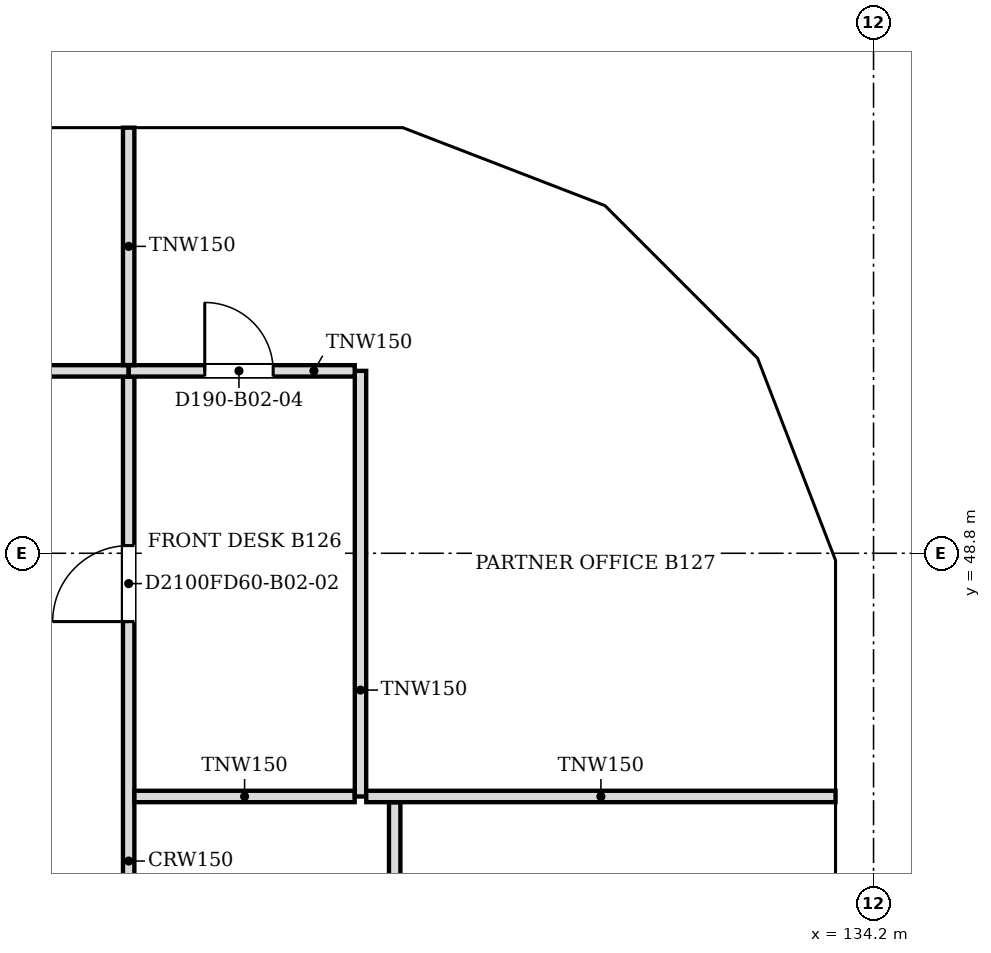
"""IFC4 building model, lengths in metres.
Left out: names, types, materials, properties, quantities, classifications, styles, units other than length and angle.
Written with IfcOpenShell. Run it as: python <this file> out.ifc"""

import sys

from ifc_helpers import new_model, si_unit, direction, frame, frame_2d, origin, place, context, subcontext, project, spatial, polyline, rectangle, outline, extrude, faceted_brep, source, transform, mapped, element, fill, save


model = new_model("IFC4")
c1 = context("Model", 3, precision=1e-05, world=origin(), true_north=direction((0.0, 1.0)))
c2 = subcontext(c1, "Body", "Model", "MODEL_VIEW")
j1 = project(units=[si_unit("LENGTHUNIT", "METRE"), si_unit("PLANEANGLEUNIT", "RADIAN")], contexts=[c1])
p1 = place(None, origin())
s1 = spatial("IfcSite", under=j1, at=p1, CompositionType="ELEMENT")
p2 = place(p1, origin())
s2 = spatial("IfcBuilding", under=s1, at=p2, CompositionType="ELEMENT")
p3 = place(p2, frame((0.0, 0.0, 21.3)))
s3 = spatial("IfcBuildingStorey", under=s2, at=p3, CompositionType="ELEMENT", Elevation=21.3)
m1 = source(origin(), c2, "Body", "SweptSolid", [
    extrude(outline(polyline([(3.05, 0.0), (6.1, 4.5), (3.05, 9.0), (0.0, 4.5), (3.05, 0.0)])), frame((0.0, 0.25, 0.0), z_axis=(0.0, -1.0, 0.0), x_axis=(1.0, 0.0, 0.0)), (0.0, 0.0, 1.0), 0.5),
])
p4 = place(p3, frame((133.95, 39.65, -4.5), z_axis=(0.0, 0.0, 1.0), x_axis=(0.0, 1.0, 0.0)))
e1 = element("IfcWall", 1, at=p4, inside=s3, PredefinedType="SOLIDWALL", context=c2, shape_type="MappedRepresentation", body=[
    mapped(m1, transform((0.0, 0.0, 0.0), scale=1.0)),
])
m2 = source(origin(), c2, "Body", "SweptSolid", [
    extrude(outline(polyline([(3.05, 0.446), (5.798, 4.5), (3.05, 8.554), (0.302, 4.5), (3.05, 0.446)])), frame((0.0, 0.26, 0.0), z_axis=(0.0, -1.0, 0.0), x_axis=(1.0, 0.0, 0.0)), (0.0, 0.0, 1.0), 0.52),
])
p5 = place(p4, origin())
e2 = element("IfcOpeningElement", 2, at=p5, cuts=e1, PredefinedType="OPENING", context=c2, shape_type="MappedRepresentation", body=[
    mapped(m2, transform((0.0, 0.0, 0.0), scale=1.0)),
])
m3 = source(origin(), c2, "Body", "Brep", [
    faceted_brep([(3.003, -0.25, 0.0), (3.05, -0.25, 0.071), (3.05, -0.25, 8.929), (3.003, -0.25, 9.0), (0.0, -0.25, 4.5), (0.0, 0.25, 4.5), (2.957, 0.25, 8.93), (2.957, 0.25, 0.07), (3.003, 0.0, 0.0), (3.003, 0.0, 9.0)], [[[0, 1, 2, 3, 4]], [[5, 6, 7]], [[1, 0, 8]], [[9, 3, 2]], [[6, 5, 4, 3, 9]], [[5, 7, 8, 0, 4]], [[1, 8, 7, 6, 9, 2]]]),
])
p6 = place(p3, frame((133.95, 45.75, -4.5), z_axis=(0.0, 0.0, 1.0), x_axis=(0.0, 1.0, 0.0)))
e3 = element("IfcWall", 3, at=p6, inside=s3, PredefinedType="SOLIDWALL", context=c2, shape_type="MappedRepresentation", body=[
    mapped(m3, transform((0.0, 0.0, 0.0), scale=1.0)),
])
m4 = source(origin(), c2, "Body", "SweptSolid", [
    extrude(outline(polyline([(2.803, 8.25), (0.301, 4.5), (2.803, 0.75), (2.803, 8.25)])), frame((0.0, 0.26, 0.0), z_axis=(0.0, -1.0, 0.0), x_axis=(1.0, 0.0, 0.0)), (0.0, 0.0, 1.0), 0.52),
])
p7 = place(p6, origin())
e4 = element("IfcOpeningElement", 4, at=p7, cuts=e3, PredefinedType="OPENING", context=c2, shape_type="MappedRepresentation", body=[
    mapped(m4, transform((0.0, 0.0, 0.0), scale=1.0)),
])
m5 = source(origin(), c2, "Body", "Brep", [
    faceted_brep([(0.047, -0.25, 0.0), (2.997, -0.25, 4.5), (0.047, -0.25, 9.0), (0.0, -0.25, 8.93), (0.0, -0.25, 0.07), (0.093, 0.25, 8.929), (2.944, 0.25, 4.581), (2.944, 0.25, 4.419), (0.093, 0.25, 0.071), (2.997, 0.0, 4.5), (0.047, 0.0, 0.0), (0.047, 0.0, 9.0)], [[[0, 1, 2, 3, 4]], [[5, 6, 7, 8]], [[8, 7, 9, 1, 0, 10]], [[6, 5, 11, 2, 1, 9]], [[3, 2, 11]], [[10, 0, 4]], [[8, 10, 4, 3, 11, 5]], [[9, 7, 6]]]),
])
p8 = place(p3, frame((133.967, 48.71, -4.5), z_axis=(0.0, 0.0, 1.0), x_axis=(-0.359901446078, 0.932990326376, 0.0)))
e5 = element("IfcWall", 5, at=p8, inside=s3, PredefinedType="SOLIDWALL", context=c2, shape_type="MappedRepresentation", body=[
    mapped(m5, transform((0.0, 0.0, 0.0), scale=1.0)),
])
m6 = source(origin(), c2, "Body", "SweptSolid", [
    extrude(outline(polyline([(0.247, 0.761), (2.698, 4.5), (0.247, 8.239), (0.247, 0.761)])), frame((0.0, 0.26, 0.0), z_axis=(0.0, -1.0, 0.0), x_axis=(1.0, 0.0, 0.0)), (0.0, 0.0, 1.0), 0.52),
])
p9 = place(p8, origin())
e6 = element("IfcOpeningElement", 6, at=p9, cuts=e5, PredefinedType="OPENING", context=c2, shape_type="MappedRepresentation", body=[
    mapped(m6, transform((0.0, 0.0, 0.0), scale=1.0)),
])
m7 = source(origin(), c2, "Body", "Brep", [
    faceted_brep([(2.944, -0.25, 0.0), (2.997, -0.25, 0.081), (2.997, -0.25, 8.919), (2.944, -0.25, 9.0), (0.0, -0.25, 4.5), (0.053, 0.25, 4.581), (2.891, 0.25, 8.919), (2.891, 0.25, 0.081), (0.053, 0.25, 4.419), (2.944, 0.0, 0.0), (2.944, 0.0, 9.0), (0.0, 0.0, 4.5)], [[[0, 1, 2, 3, 4]], [[5, 6, 7, 8]], [[1, 0, 9]], [[10, 3, 2]], [[6, 5, 11, 4, 3, 10]], [[8, 7, 9, 0, 4, 11]], [[8, 11, 5]], [[1, 9, 7, 6, 10, 2]]]),
])
p10 = place(p3, frame((132.888, 51.506, -4.5), z_axis=(0.0, 0.0, 1.0), x_axis=(-0.707147509625, 0.707066050402, 0.0)))
e7 = element("IfcWall", 7, at=p10, inside=s3, PredefinedType="SOLIDWALL", context=c2, shape_type="MappedRepresentation", body=[
    mapped(m7, transform((0.0, 0.0, 0.0), scale=1.0)),
])
m8 = source(origin(), c2, "Body", "SweptSolid", [
    extrude(outline(polyline([(2.744, 8.238), (0.299, 4.5), (2.744, 0.762), (2.744, 8.238)])), frame((0.0, 0.26, 0.0), z_axis=(0.0, -1.0, 0.0), x_axis=(1.0, 0.0, 0.0)), (0.0, 0.0, 1.0), 0.52),
])
p11 = place(p10, origin())
e8 = element("IfcOpeningElement", 8, at=p11, cuts=e7, PredefinedType="OPENING", context=c2, shape_type="MappedRepresentation", body=[
    mapped(m8, transform((0.0, 0.0, 0.0), scale=1.0)),
])
m9 = source(origin(), c2, "Body", "Brep", [
    faceted_brep([(0.053, -0.25, 0.0), (3.003, -0.25, 4.5), (0.053, -0.25, 9.0), (0.0, -0.25, 8.919), (0.0, -0.25, 0.081), (0.106, 0.25, 8.919), (2.957, 0.25, 4.571), (2.957, 0.25, 4.429), (0.106, 0.25, 0.081), (3.003, 0.0, 4.5), (0.053, 0.0, 0.0), (0.053, 0.0, 9.0)], [[[0, 1, 2, 3, 4]], [[5, 6, 7, 8]], [[8, 7, 9, 1, 0, 10]], [[6, 5, 11, 2, 1, 9]], [[3, 2, 11]], [[10, 0, 4]], [[8, 10, 4, 3, 11, 5]], [[9, 7, 6]]]),
])
p12 = place(p3, frame((130.856, 53.569, -4.5), z_axis=(0.0, 0.0, 1.0), x_axis=(-0.933007896601, 0.359855894603, 0.0)))
e9 = element("IfcWall", 9, at=p12, inside=s3, PredefinedType="SOLIDWALL", context=c2, shape_type="MappedRepresentation", body=[
    mapped(m9, transform((0.0, 0.0, 0.0), scale=1.0)),
])
m10 = source(origin(), c2, "Body", "SweptSolid", [
    extrude(outline(polyline([(0.253, 0.761), (2.705, 4.5), (0.253, 8.239), (0.253, 0.761)])), frame((0.0, 0.26, 0.0), z_axis=(0.0, -1.0, 0.0), x_axis=(1.0, 0.0, 0.0)), (0.0, 0.0, 1.0), 0.52),
])
p13 = place(p12, origin())
e10 = element("IfcOpeningElement", 10, at=p13, cuts=e9, PredefinedType="OPENING", context=c2, shape_type="MappedRepresentation", body=[
    mapped(m10, transform((0.0, 0.0, 0.0), scale=1.0)),
])
m11 = source(origin(), c2, "Body", "Brep", [
    faceted_brep([(3.003, -0.25, 0.0), (6.053, -0.25, 4.5), (3.003, -0.25, 9.0), (0.0, -0.25, 4.5), (0.047, 0.25, 4.57), (3.003, 0.25, 9.0), (6.053, 0.25, 4.5), (3.003, 0.25, 0.0), (0.047, 0.25, 4.43), (0.0, 0.0, 4.5)], [[[0, 1, 2, 3]], [[4, 5, 6, 7, 8]], [[7, 6, 1, 0]], [[6, 5, 2, 1]], [[5, 4, 9, 3, 2]], [[8, 7, 0, 3, 9]], [[8, 9, 4]]]),
])
p14 = place(p3, frame((128.053, 54.65, -4.5), z_axis=(0.0, 0.0, 1.0), x_axis=(-1.0, 0.0, 0.0)))
e11 = element("IfcWall", 11, at=p14, inside=s3, PredefinedType="SOLIDWALL", context=c2, shape_type="MappedRepresentation", body=[
    mapped(m11, transform((0.0, 0.0, 0.0), scale=1.0)),
])
m12 = source(origin(), c2, "Body", "SweptSolid", [
    extrude(outline(polyline([(3.005, 0.448), (5.751, 4.5), (3.005, 8.552), (0.301, 4.5), (3.005, 0.448)])), frame((0.0, 0.26, 0.0), z_axis=(0.0, -1.0, 0.0), x_axis=(1.0, 0.0, 0.0)), (0.0, 0.0, 1.0), 0.52),
])
p15 = place(p14, origin())
e12 = element("IfcOpeningElement", 12, at=p15, cuts=e11, PredefinedType="OPENING", context=c2, shape_type="MappedRepresentation", body=[
    mapped(m12, transform((0.0, 0.0, 0.0), scale=1.0)),
])
m13 = source(origin(), c2, "Body", "Brep", [
    faceted_brep([(3.05, -0.25, 0.0), (6.053, -0.25, 4.5), (0.0, -0.25, 4.5), (0.0, 0.25, 4.5), (6.007, 0.25, 4.5), (6.007, 0.25, 4.43), (3.05, 0.25, 0.0), (6.053, 0.0, 4.5)], [[[0, 1, 2]], [[3, 4, 5, 6]], [[6, 5, 7, 1, 0]], [[4, 3, 2, 1, 7]], [[3, 6, 0, 2]], [[5, 4, 7]]]),
])
p16 = place(p3, frame((133.95, 42.7, 0.0), z_axis=(0.0, 0.0, 1.0), x_axis=(0.0, 1.0, 0.0)))
e13 = element("IfcWall", 13, at=p16, inside=s3, PredefinedType="SOLIDWALL", context=c2, shape_type="MappedRepresentation", body=[
    mapped(m13, transform((0.0, 0.0, 0.0), scale=1.0)),
])
m14 = source(origin(), c2, "Body", "SweptSolid", [
    extrude(outline(polyline([(3.048, 0.448), (5.586, 4.25), (0.471, 4.25), (3.048, 0.448)])), frame((0.0, 0.26, 0.0), z_axis=(0.0, -1.0, 0.0), x_axis=(1.0, 0.0, 0.0)), (0.0, 0.0, 1.0), 0.52),
])
p17 = place(p16, origin())
e14 = element("IfcOpeningElement", 14, at=p17, cuts=e13, PredefinedType="OPENING", context=c2, shape_type="MappedRepresentation", body=[
    mapped(m14, transform((0.0, 0.0, 0.0), scale=1.0)),
])
m15 = source(origin(), c2, "Body", "Brep", [
    faceted_brep([(2.95, -0.25, 0.0), (3.003, -0.25, 0.081), (3.003, -0.25, 4.5), (0.0, -0.25, 4.5), (0.047, 0.25, 4.5), (2.898, 0.25, 4.5), (2.898, 0.25, 0.081), (0.047, 0.25, 4.429), (2.95, 0.0, 0.0), (0.0, 0.0, 4.5)], [[[0, 1, 2, 3]], [[4, 5, 6, 7]], [[1, 0, 8]], [[5, 4, 9, 3, 2]], [[7, 6, 8, 0, 3, 9]], [[7, 9, 4]], [[1, 8, 6, 5, 2]]]),
])
p18 = place(p3, frame((133.95, 48.753, 0.0), z_axis=(0.0, 0.0, 1.0), x_axis=(-0.359855894603, 0.933007896601, 0.0)))
e15 = element("IfcWall", 15, at=p18, inside=s3, PredefinedType="SOLIDWALL", context=c2, shape_type="MappedRepresentation", body=[
    mapped(m15, transform((0.0, 0.0, 0.0), scale=1.0)),
])
m16 = source(origin(), c2, "Body", "SweptSolid", [
    extrude(outline(polyline([(2.75, 4.25), (0.463, 4.25), (2.75, 0.761), (2.75, 4.25)])), frame((0.0, 0.26, 0.0), z_axis=(0.0, -1.0, 0.0), x_axis=(1.0, 0.0, 0.0)), (0.0, 0.0, 1.0), 0.52),
])
p19 = place(p18, origin())
e16 = element("IfcOpeningElement", 16, at=p19, cuts=e15, PredefinedType="OPENING", context=c2, shape_type="MappedRepresentation", body=[
    mapped(m16, transform((0.0, 0.0, 0.0), scale=1.0)),
])
m17 = source(origin(), c2, "Body", "Brep", [
    faceted_brep([(0.053, -0.25, 0.0), (2.997, -0.25, 4.5), (0.0, -0.25, 4.5), (0.0, -0.25, 0.081), (0.106, 0.25, 4.5), (2.944, 0.25, 4.5), (2.944, 0.25, 4.419), (0.106, 0.25, 0.081), (2.997, 0.0, 4.5), (0.053, 0.0, 0.0)], [[[0, 1, 2, 3]], [[4, 5, 6, 7]], [[7, 6, 8, 1, 0, 9]], [[5, 4, 2, 1, 8]], [[9, 0, 3]], [[7, 9, 3, 2, 4]], [[6, 5, 8]]]),
])
p20 = place(p3, frame((132.926, 51.469, 0.0), z_axis=(0.0, 0.0, 1.0), x_axis=(-0.707066050402, 0.707147509625, 0.0)))
e17 = element("IfcWall", 17, at=p20, inside=s3, PredefinedType="SOLIDWALL", context=c2, shape_type="MappedRepresentation", body=[
    mapped(m17, transform((0.0, 0.0, 0.0), scale=1.0)),
])
m18 = source(origin(), c2, "Body", "SweptSolid", [
    extrude(outline(polyline([(0.253, 0.762), (2.535, 4.25), (0.253, 4.25), (0.253, 0.762)])), frame((0.0, 0.26, 0.0), z_axis=(0.0, -1.0, 0.0), x_axis=(1.0, 0.0, 0.0)), (0.0, 0.0, 1.0), 0.52),
])
p21 = place(p20, origin())
e18 = element("IfcOpeningElement", 18, at=p21, cuts=e17, PredefinedType="OPENING", context=c2, shape_type="MappedRepresentation", body=[
    mapped(m18, transform((0.0, 0.0, 0.0), scale=1.0)),
])
m19 = source(origin(), c2, "Body", "Brep", [
    faceted_brep([(2.95, -0.25, 0.0), (2.997, -0.25, 0.07), (2.997, -0.25, 4.5), (0.0, -0.25, 4.5), (0.053, 0.25, 4.5), (2.904, 0.25, 4.5), (2.904, 0.25, 0.071), (0.053, 0.25, 4.419), (2.95, 0.0, 0.0), (0.0, 0.0, 4.5)], [[[0, 1, 2, 3]], [[4, 5, 6, 7]], [[1, 0, 8]], [[5, 4, 9, 3, 2]], [[7, 6, 8, 0, 3, 9]], [[7, 9, 4]], [[1, 8, 6, 5, 2]]]),
])
p22 = place(p3, frame((130.806, 53.588, 0.0), z_axis=(0.0, 0.0, 1.0), x_axis=(-0.932990326376, 0.359901446078, 0.0)))
e19 = element("IfcWall", 19, at=p22, inside=s3, PredefinedType="SOLIDWALL", context=c2, shape_type="MappedRepresentation", body=[
    mapped(m19, transform((0.0, 0.0, 0.0), scale=1.0)),
])
p23 = place(p22, origin())
e20 = element("IfcOpeningElement", 20, at=p23, cuts=e19, PredefinedType="OPENING", context=c2, shape_type="MappedRepresentation", body=[
    mapped(m16, transform((0.0, 0.0, 0.0), scale=1.0)),
])
m20 = source(origin(), c2, "Body", "Brep", [
    faceted_brep([(0.047, -0.25, 0.0), (3.05, -0.25, 4.5), (0.0, -0.25, 4.5), (0.0, -0.25, 0.071), (0.093, 0.25, 4.5), (3.05, 0.25, 4.5), (0.093, 0.25, 0.07), (0.047, 0.0, 0.0)], [[[0, 1, 2, 3]], [[4, 5, 6]], [[6, 5, 1, 0, 7]], [[5, 4, 2, 1]], [[7, 0, 3]], [[6, 7, 3, 2, 4]]]),
])
p24 = place(p3, frame((128.1, 54.65, 0.0), z_axis=(0.0, 0.0, 1.0), x_axis=(-1.0, 0.0, 0.0)))
e21 = element("IfcWall", 21, at=p24, inside=s3, PredefinedType="SOLIDWALL", context=c2, shape_type="MappedRepresentation", body=[
    mapped(m20, transform((0.0, 0.0, 0.0), scale=1.0)),
])
m21 = source(origin(), c2, "Body", "SweptSolid", [
    extrude(outline(polyline([(0.247, 0.75), (2.583, 4.25), (0.247, 4.25), (0.247, 0.75)])), frame((0.0, 0.26, 0.0), z_axis=(0.0, -1.0, 0.0), x_axis=(1.0, 0.0, 0.0)), (0.0, 0.0, 1.0), 0.52),
])
p25 = place(p24, origin())
e22 = element("IfcOpeningElement", 22, at=p25, cuts=e21, PredefinedType="OPENING", context=c2, shape_type="MappedRepresentation", body=[
    mapped(m21, transform((0.0, 0.0, 0.0), scale=1.0)),
])
m22 = source(origin(), c2, "Body", "SweptSolid", [
    extrude(outline(polyline([(3.05, 0.0), (6.1, 4.5), (0.0, 4.5), (3.05, 0.0)])), frame((0.0, 0.25, 0.0), z_axis=(0.0, -1.0, 0.0), x_axis=(1.0, 0.0, 0.0)), (0.0, 0.0, 1.0), 0.5),
])
p26 = place(p3, frame((125.05, 54.65, 0.0), z_axis=(0.0, 0.0, 1.0), x_axis=(-1.0, 0.0, 0.0)))
e23 = element("IfcWall", 23, at=p26, inside=s3, PredefinedType="SOLIDWALL", context=c2, shape_type="MappedRepresentation", body=[
    mapped(m22, transform((0.0, 0.0, 0.0), scale=1.0)),
])
m23 = source(origin(), c2, "Body", "SweptSolid", [
    extrude(outline(polyline([(3.05, 0.446), (5.629, 4.25), (0.471, 4.25), (3.05, 0.446)])), frame((0.0, 0.26, 0.0), z_axis=(0.0, -1.0, 0.0), x_axis=(1.0, 0.0, 0.0)), (0.0, 0.0, 1.0), 0.52),
])
p27 = place(p26, origin())
e24 = element("IfcOpeningElement", 24, at=p27, cuts=e23, PredefinedType="OPENING", context=c2, shape_type="MappedRepresentation", body=[
    mapped(m23, transform((0.0, 0.0, 0.0), scale=1.0)),
])
p28 = place(p3, frame((124.4, 51.124, 0.0), z_axis=(0.0, 0.0, 1.0), x_axis=(0.0, -1.0, 0.0)))
e25 = element("IfcWall", 25, at=p28, inside=s3, PredefinedType="PARTITIONING", context=c2, shape_type="SweptSolid", body=[
    extrude(rectangle(XDim=14.524, YDim=0.15, at=frame_2d((7.262, 0.0))), origin(), (0.0, 0.0, 1.0), 3.767),
])
m24 = source(origin(), c2, "Body", "SweptSolid", [
    extrude(rectangle(XDim=1.0, YDim=2.1, at=frame_2d((0.5, 1.05))), frame((0.0, 0.085, 0.0), z_axis=(0.0, -1.0, 0.0), x_axis=(1.0, 0.0, 0.0)), (0.0, 0.0, 1.0), 0.17),
])
p29 = place(p28, frame((2.223, 0.0, 0.0)))
e26 = element("IfcOpeningElement", 26, at=p29, cuts=e25, PredefinedType="OPENING", context=c2, shape_type="MappedRepresentation", body=[
    mapped(m24, transform((0.0, 0.0, 0.0), scale=1.0)),
])
p30 = place(p28, frame((9.524, 0.0, 0.0)))
e27 = element("IfcOpeningElement", 27, at=p30, cuts=e25, PredefinedType="OPENING", context=c2, shape_type="MappedRepresentation", body=[
    mapped(m24, transform((0.0, 0.0, 0.0), scale=1.0)),
])
p31 = place(p3, frame((127.9, 45.524, 0.0), z_axis=(0.0, 0.0, 1.0), x_axis=(0.0, -1.0, 0.0)))
e28 = element("IfcWall", 28, at=p31, inside=s3, PredefinedType="PARTITIONING", context=c2, shape_type="SweptSolid", body=[
    extrude(rectangle(XDim=8.848, YDim=0.15, at=frame_2d((4.424, 0.0))), origin(), (0.0, 0.0, 1.0), 3.767),
])
m25 = source(origin(), c2, "Body", "SweptSolid", [
    extrude(rectangle(XDim=0.9, YDim=2.1, at=frame_2d((0.45, 1.05))), frame((0.0, 0.085, 0.0), z_axis=(0.0, -1.0, 0.0), x_axis=(1.0, 0.0, 0.0)), (0.0, 0.0, 1.0), 0.17),
])
p32 = place(p31, frame((6.248, 0.0, 0.0)))
e29 = element("IfcOpeningElement", 29, at=p32, cuts=e28, PredefinedType="OPENING", context=c2, shape_type="MappedRepresentation", body=[
    mapped(m25, transform((0.0, 0.0, 0.0), scale=1.0)),
])
p33 = place(p31, frame((1.876, 0.0, 0.0)))
e30 = element("IfcOpeningElement", 30, at=p33, cuts=e28, PredefinedType="OPENING", context=c2, shape_type="MappedRepresentation", body=[
    mapped(m25, transform((0.0, 0.0, 0.0), scale=1.0)),
])
p34 = place(p3, frame((124.476, 45.6, 0.0), z_axis=(0.0, 0.0, 1.0), x_axis=(1.0, 0.0, 0.0)))
e31 = element("IfcWall", 31, at=p34, inside=s3, PredefinedType="PARTITIONING", context=c2, shape_type="SweptSolid", body=[
    extrude(rectangle(XDim=2.898, YDim=0.15, at=frame_2d((1.449, 0.0))), origin(), (0.0, 0.0, 1.0), 3.767),
])
p35 = place(p3, frame((127.45, 45.6, 0.0), z_axis=(0.0, 0.0, 1.0), x_axis=(0.0, 1.0, 0.0)))
e32 = element("IfcWall", 32, at=p35, inside=s3, PredefinedType="PARTITIONING", context=c2, shape_type="SweptSolid", body=[
    extrude(rectangle(XDim=5.6, YDim=0.15, at=frame_2d((2.8, 0.0))), origin(), (0.0, 0.0, 1.0), 3.767),
])
p36 = place(p3, frame((127.526, 45.6, 0.0), z_axis=(0.0, 0.0, 1.0), x_axis=(1.0, 0.0, 0.0)))
e33 = element("IfcWall", 33, at=p36, inside=s3, PredefinedType="PARTITIONING", context=c2, shape_type="SweptSolid", body=[
    extrude(rectangle(XDim=6.174, YDim=0.15, at=frame_2d((3.087, 0.0))), origin(), (0.0, 0.0, 1.0), 3.767),
])
p37 = place(p3, frame((108.5, 51.2, 0.0), z_axis=(0.0, 0.0, 1.0), x_axis=(1.0, 0.0, 0.0)))
e34 = element("IfcWall", 34, at=p37, inside=s3, PredefinedType="PARTITIONING", context=c2, shape_type="SweptSolid", body=[
    extrude(rectangle(XDim=15.9, YDim=0.15, at=frame_2d((7.95, 0.0))), origin(), (0.0, 0.0, 1.0), 3.767),
])
p38 = place(p37, frame((7.5, 0.0, 0.0)))
e35 = element("IfcOpeningElement", 35, at=p38, cuts=e34, PredefinedType="OPENING", context=c2, shape_type="MappedRepresentation", body=[
    mapped(m25, transform((0.0, 0.0, 0.0), scale=1.0)),
])
p39 = place(p3, frame((124.401, 51.2, 0.0), z_axis=(0.0, 0.0, 1.0), x_axis=(1.0, 0.0, 0.0)))
e36 = element("IfcWall", 36, at=p39, inside=s3, PredefinedType="PARTITIONING", context=c2, shape_type="SweptSolid", body=[
    extrude(rectangle(XDim=2.973, YDim=0.15, at=frame_2d((1.487, 0.0))), origin(), (0.0, 0.0, 1.0), 3.767),
])
p40 = place(p39, frame((1.0, 0.0, 0.0)))
e37 = element("IfcOpeningElement", 37, at=p40, cuts=e36, PredefinedType="OPENING", context=c2, shape_type="MappedRepresentation", body=[
    mapped(m25, transform((0.0, 0.0, 0.0), scale=1.0)),
])
p41 = place(p3, frame((124.4, 51.276, 0.0), z_axis=(0.0, 0.0, 1.0), x_axis=(0.0, 1.0, 0.0)))
e38 = element("IfcWall", 38, at=p41, inside=s3, PredefinedType="PARTITIONING", context=c2, shape_type="SweptSolid", body=[
    extrude(rectangle(XDim=3.124, YDim=0.15, at=frame_2d((1.562, 0.0))), origin(), (0.0, 0.0, 1.0), 3.767),
])
m26 = source(origin(), c2, "Body", "SweptSolid", [
    extrude(rectangle(XDim=1.0, YDim=2.1, at=frame_2d((0.5, 1.05))), frame((0.0, 0.025, 0.0), z_axis=(0.0, -1.0, 0.0), x_axis=(1.0, 0.0, 0.0)), (0.0, 0.0, 1.0), 0.05),
])
p42 = place(p29, origin())
e39 = element("IfcDoor", 39, at=p42, inside=s3, OperationType="SINGLE_SWING_RIGHT", PredefinedType="DOOR", context=c2, shape_type="MappedRepresentation", body=[
    mapped(m26, transform((0.0, 0.0, 0.0), scale=1.0)),
])
fill(e26, e39)
m27 = source(origin(), c2, "Body", "SweptSolid", [
    extrude(rectangle(XDim=0.9, YDim=2.1, at=frame_2d((0.45, 1.05))), frame((0.0, 0.025, 0.0), z_axis=(0.0, -1.0, 0.0), x_axis=(1.0, 0.0, 0.0)), (0.0, 0.0, 1.0), 0.05),
])
p43 = place(p40, origin())
e40 = element("IfcDoor", 40, at=p43, inside=s3, OperationType="SINGLE_SWING_LEFT", PredefinedType="DOOR", context=c2, shape_type="MappedRepresentation", body=[
    mapped(m27, transform((0.0, 0.0, 0.0), scale=1.0)),
])
fill(e37, e40)
save(model, sys.argv[1])
